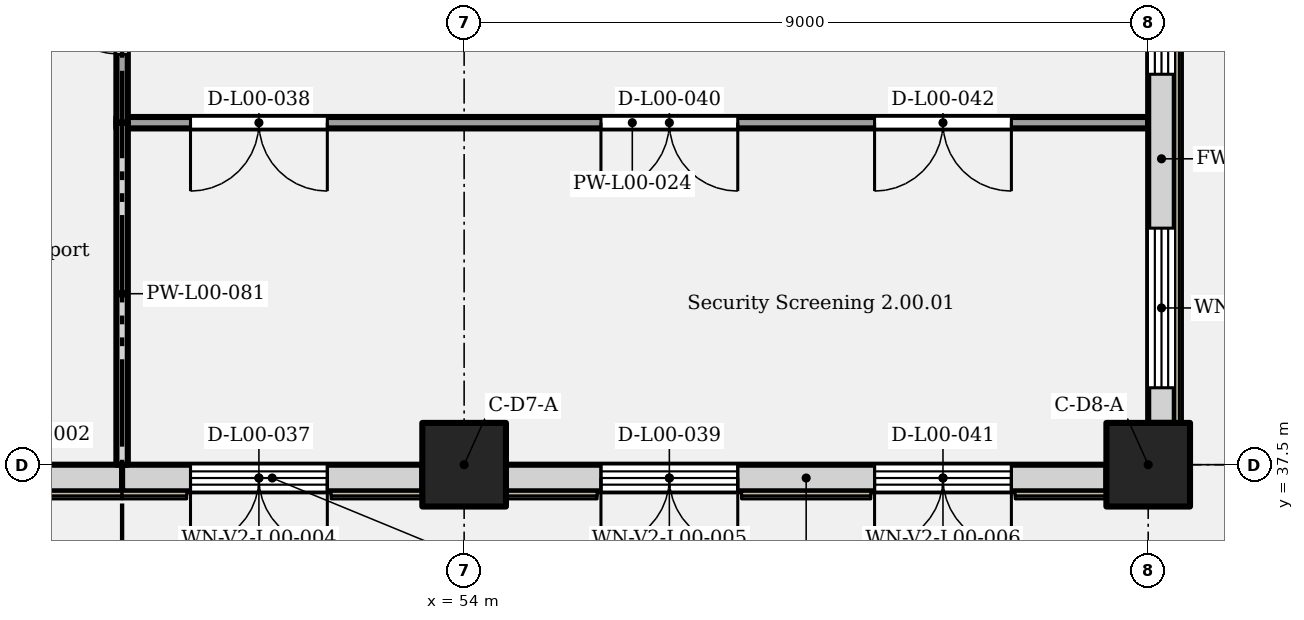
"""IFC4 building model, lengths in metres.
Left out: names, types, materials, properties, quantities, classifications, styles, units other than length and angle.
Written with IfcOpenShell. Run it as: python <this file> out.ifc"""

import sys

from ifc_helpers import new_model, si_unit, direction, frame, frame_2d, origin, origin_2d, place, context, subcontext, project, spatial, rectangle, extrude, element, fill, save


model = new_model("IFC4")
c1 = context("Model", 3, precision=1e-05, world=origin(), true_north=direction((0.0, 1.0)))
c2 = subcontext(c1, "Body", "Model", "MODEL_VIEW")
j1 = project(units=[si_unit("LENGTHUNIT", "METRE"), si_unit("PLANEANGLEUNIT", "RADIAN")], contexts=[c1])
p1 = place(None, origin())
s1 = spatial("IfcSite", under=j1, at=p1, CompositionType="ELEMENT")
p2 = place(p1, origin())
s2 = spatial("IfcBuilding", under=s1, at=p2, CompositionType="ELEMENT")
p3 = place(p2, origin())
s3 = spatial("IfcBuildingStorey", under=s2, at=p3, CompositionType="ELEMENT", Elevation=0.0)
for number, where, z_axis, x_axis in (
    (1, (54.0, 37.5, 0.0), (0.0, 0.0, 1.0), (1.0, 0.0, 0.0)),
    (2, (63.0, 37.5, 0.0), (0.0, 0.0, 1.0), (1.0, 0.0, 0.0)),
):
    element("IfcColumn", number, at=place(p3, frame(where, z_axis=z_axis, x_axis=x_axis)), inside=s3, PredefinedType="COLUMN", context=c2, shape_type="SweptSolid", body=[
        extrude(rectangle(XDim=1.1, YDim=1.1, at=origin_2d()), origin(), (0.0, 0.0, 1.0), 6.6),
    ])
p4 = place(p3, frame((45.55, 37.325, 0.0), z_axis=(0.0, 0.0, 1.0), x_axis=(1.0, 0.0, 0.0)))
e3 = element("IfcWall", 3, at=p4, inside=s3, PredefinedType="SOLIDWALL", context=c2, shape_type="SweptSolid", body=[
    extrude(rectangle(XDim=3.95, YDim=0.35, at=frame_2d((1.975, 0.0))), origin(), (0.0, 0.0, 1.0), 6.3),
])
p5 = place(p4, frame((0.425, 0.0, 1.05)))
e4 = element("IfcOpeningElement", 4, at=p5, cuts=e3, PredefinedType="OPENING", context=c2, shape_type="SweptSolid", body=[
    extrude(rectangle(XDim=1.05, YDim=2.4, at=frame_2d((0.525, 1.2))), frame((0.0, 0.185, 0.0), z_axis=(0.0, -1.0, 0.0), x_axis=(1.0, 0.0, 0.0)), (0.0, 0.0, 1.0), 0.37),
])
p6 = place(p3, frame((49.5, 37.325, 0.0), z_axis=(0.0, 0.0, 1.0), x_axis=(1.0, 0.0, 0.0)))
e5 = element("IfcWall", 5, at=p6, inside=s3, PredefinedType="SOLIDWALL", context=c2, shape_type="SweptSolid", body=[
    extrude(rectangle(XDim=3.95, YDim=0.35, at=frame_2d((1.975, 0.0))), origin(), (0.0, 0.0, 1.0), 6.3),
])
p7 = place(p6, frame((2.7, 0.0, 0.0), z_axis=(0.0, 0.0, 1.0), x_axis=(-1.0, 0.0, 0.0)))
e6 = element("IfcOpeningElement", 6, at=p7, cuts=e5, PredefinedType="OPENING", context=c2, shape_type="SweptSolid", body=[
    extrude(rectangle(XDim=1.8, YDim=2.1, at=frame_2d((0.9, 1.05))), frame((0.0, 0.185, 0.0), z_axis=(0.0, -1.0, 0.0), x_axis=(1.0, 0.0, 0.0)), (0.0, 0.0, 1.0), 0.37),
])
p8 = place(p6, frame((0.9, 0.0, 2.25)))
e7 = element("IfcOpeningElement", 7, at=p8, cuts=e5, PredefinedType="OPENING", context=c2, shape_type="SweptSolid", body=[
    extrude(rectangle(XDim=1.8, YDim=0.8, at=frame_2d((0.9, 0.4))), frame((0.0, 0.185, 0.0), z_axis=(0.0, -1.0, 0.0), x_axis=(1.0, 0.0, 0.0)), (0.0, 0.0, 1.0), 0.37),
])
p9 = place(p3, frame((54.55, 37.325, 0.0), z_axis=(0.0, 0.0, 1.0), x_axis=(1.0, 0.0, 0.0)))
e8 = element("IfcWall", 8, at=p9, inside=s3, PredefinedType="SOLIDWALL", context=c2, shape_type="SweptSolid", body=[
    extrude(rectangle(XDim=7.9, YDim=0.35, at=frame_2d((3.95, 0.0))), origin(), (0.0, 0.0, 1.0), 6.3),
])
p10 = place(p9, frame((3.05, 0.0, 0.0), z_axis=(0.0, 0.0, 1.0), x_axis=(-1.0, 0.0, 0.0)))
e9 = element("IfcOpeningElement", 9, at=p10, cuts=e8, PredefinedType="OPENING", context=c2, shape_type="SweptSolid", body=[
    extrude(rectangle(XDim=1.8, YDim=2.1, at=frame_2d((0.9, 1.05))), frame((0.0, 0.185, 0.0), z_axis=(0.0, -1.0, 0.0), x_axis=(1.0, 0.0, 0.0)), (0.0, 0.0, 1.0), 0.37),
])
p11 = place(p9, frame((1.25, 0.0, 2.25)))
e10 = element("IfcOpeningElement", 10, at=p11, cuts=e8, PredefinedType="OPENING", context=c2, shape_type="SweptSolid", body=[
    extrude(rectangle(XDim=1.8, YDim=0.8, at=frame_2d((0.9, 0.4))), frame((0.0, 0.185, 0.0), z_axis=(0.0, -1.0, 0.0), x_axis=(1.0, 0.0, 0.0)), (0.0, 0.0, 1.0), 0.37),
])
p12 = place(p9, frame((6.65, 0.0, 0.0), z_axis=(0.0, 0.0, 1.0), x_axis=(-1.0, 0.0, 0.0)))
e11 = element("IfcOpeningElement", 11, at=p12, cuts=e8, PredefinedType="OPENING", context=c2, shape_type="SweptSolid", body=[
    extrude(rectangle(XDim=1.8, YDim=2.1, at=frame_2d((0.9, 1.05))), frame((0.0, 0.185, 0.0), z_axis=(0.0, -1.0, 0.0), x_axis=(1.0, 0.0, 0.0)), (0.0, 0.0, 1.0), 0.37),
])
p13 = place(p9, frame((4.85, 0.0, 2.25)))
e12 = element("IfcOpeningElement", 12, at=p13, cuts=e8, PredefinedType="OPENING", context=c2, shape_type="SweptSolid", body=[
    extrude(rectangle(XDim=1.8, YDim=0.8, at=frame_2d((0.9, 0.4))), frame((0.0, 0.185, 0.0), z_axis=(0.0, -1.0, 0.0), x_axis=(1.0, 0.0, 0.0)), (0.0, 0.0, 1.0), 0.37),
])
p14 = place(p3, frame((63.175, 38.05, 0.0), z_axis=(0.0, 0.0, 1.0), x_axis=(0.0, 1.0, 0.0)))
e13 = element("IfcWall", 13, at=p14, inside=s3, PredefinedType="SOLIDWALL", context=c2, shape_type="SweptSolid", body=[
    extrude(rectangle(XDim=6.95, YDim=0.35, at=frame_2d((3.475, 0.0))), origin(), (0.0, 0.0, 1.0), 6.3),
])
p15 = place(p14, frame((0.462, 0.0, 0.9)))
e14 = element("IfcOpeningElement", 14, at=p15, cuts=e13, PredefinedType="OPENING", context=c2, shape_type="SweptSolid", body=[
    extrude(rectangle(XDim=2.1, YDim=3.6, at=frame_2d((1.05, 1.8))), frame((0.0, 0.185, 0.0), z_axis=(0.0, -1.0, 0.0), x_axis=(1.0, 0.0, 0.0)), (0.0, 0.0, 1.0), 0.37),
])
p16 = place(p14, frame((4.587, 0.0, 0.9)))
e15 = element("IfcOpeningElement", 15, at=p16, cuts=e13, PredefinedType="OPENING", context=c2, shape_type="SweptSolid", body=[
    extrude(rectangle(XDim=2.1, YDim=3.6, at=frame_2d((1.05, 1.8))), frame((0.0, 0.185, 0.0), z_axis=(0.0, -1.0, 0.0), x_axis=(1.0, 0.0, 0.0)), (0.0, 0.0, 1.0), 0.37),
])
p17 = place(p3, frame((49.425, 42.0, 0.0), z_axis=(0.0, 0.0, 1.0), x_axis=(1.0, 0.0, 0.0)))
e16 = element("IfcWall", 16, at=p17, inside=s3, PredefinedType="PARTITIONING", context=c2, shape_type="SweptSolid", body=[
    extrude(rectangle(XDim=13.575, YDim=0.15, at=frame_2d((6.788, 0.0))), origin(), (0.0, 0.0, 1.0), 6.3),
])
p18 = place(p17, frame((2.775, 0.0, 0.0), z_axis=(0.0, 0.0, 1.0), x_axis=(-1.0, 0.0, 0.0)))
e17 = element("IfcOpeningElement", 17, at=p18, cuts=e16, PredefinedType="OPENING", context=c2, shape_type="SweptSolid", body=[
    extrude(rectangle(XDim=1.8, YDim=2.1, at=frame_2d((0.9, 1.05))), frame((0.0, 0.085, 0.0), z_axis=(0.0, -1.0, 0.0), x_axis=(1.0, 0.0, 0.0)), (0.0, 0.0, 1.0), 0.17),
])
p19 = place(p17, frame((8.175, 0.0, 0.0), z_axis=(0.0, 0.0, 1.0), x_axis=(-1.0, 0.0, 0.0)))
e18 = element("IfcOpeningElement", 18, at=p19, cuts=e16, PredefinedType="OPENING", context=c2, shape_type="SweptSolid", body=[
    extrude(rectangle(XDim=1.8, YDim=2.1, at=frame_2d((0.9, 1.05))), frame((0.0, 0.085, 0.0), z_axis=(0.0, -1.0, 0.0), x_axis=(1.0, 0.0, 0.0)), (0.0, 0.0, 1.0), 0.17),
])
p20 = place(p17, frame((11.775, 0.0, 0.0), z_axis=(0.0, 0.0, 1.0), x_axis=(-1.0, 0.0, 0.0)))
e19 = element("IfcOpeningElement", 19, at=p20, cuts=e16, PredefinedType="OPENING", context=c2, shape_type="SweptSolid", body=[
    extrude(rectangle(XDim=1.8, YDim=2.1, at=frame_2d((0.9, 1.05))), frame((0.0, 0.085, 0.0), z_axis=(0.0, -1.0, 0.0), x_axis=(1.0, 0.0, 0.0)), (0.0, 0.0, 1.0), 0.17),
])
p21 = place(p3, frame((49.5, 37.5, 0.0), z_axis=(0.0, 0.0, 1.0), x_axis=(0.0, 1.0, 0.0)))
e20 = element("IfcWall", 20, at=p21, inside=s3, PredefinedType="PARTITIONING", context=c2, shape_type="SweptSolid", body=[
    extrude(rectangle(XDim=4.5, YDim=0.15, at=frame_2d((2.25, 0.0))), origin(), (0.0, 0.0, 1.0), 6.3),
])
p22 = place(p3, frame((49.5, 42.0, 0.0), z_axis=(0.0, 0.0, 1.0), x_axis=(0.0, 1.0, 0.0)))
e21 = element("IfcWall", 21, at=p22, inside=s3, PredefinedType="PARTITIONING", context=c2, shape_type="SweptSolid", body=[
    extrude(rectangle(XDim=12.0, YDim=0.15, at=frame_2d((6.0, 0.0))), origin(), (0.0, 0.0, 1.0), 6.3),
])
p23 = place(p22, frame((0.9, 0.0, 0.0)))
e22 = element("IfcOpeningElement", 22, at=p23, cuts=e21, PredefinedType="OPENING", context=c2, shape_type="SweptSolid", body=[
    extrude(rectangle(XDim=1.2, YDim=2.1, at=frame_2d((0.6, 1.05))), frame((0.0, 0.085, 0.0), z_axis=(0.0, -1.0, 0.0), x_axis=(1.0, 0.0, 0.0)), (0.0, 0.0, 1.0), 0.17),
])
p24 = place(p22, frame((6.9, 0.0, 0.0)))
e23 = element("IfcOpeningElement", 23, at=p24, cuts=e21, PredefinedType="OPENING", context=c2, shape_type="SweptSolid", body=[
    extrude(rectangle(XDim=1.2, YDim=2.1, at=frame_2d((0.6, 1.05))), frame((0.0, 0.085, 0.0), z_axis=(0.0, -1.0, 0.0), x_axis=(1.0, 0.0, 0.0)), (0.0, 0.0, 1.0), 0.17),
])
p25 = place(p7, origin())
e24 = element("IfcDoor", 24, at=p25, inside=s3, OperationType="DOUBLE_DOOR_SINGLE_SWING", PredefinedType="DOOR", context=c2, shape_type="SweptSolid", body=[
    extrude(rectangle(XDim=1.8, YDim=2.1, at=frame_2d((0.9, 1.05))), frame((0.0, 0.025, 0.0), z_axis=(0.0, -1.0, 0.0), x_axis=(1.0, 0.0, 0.0)), (0.0, 0.0, 1.0), 0.05),
])
fill(e6, e24)
p26 = place(p8, origin())
e25 = element("IfcWindow", 25, at=p26, inside=s3, PartitioningType="SINGLE_PANEL", PredefinedType="WINDOW", context=c2, shape_type="SweptSolid", body=[
    extrude(rectangle(XDim=1.8, YDim=0.8, at=frame_2d((0.9, 0.4))), frame((0.0, 0.03, 0.0), z_axis=(0.0, -1.0, 0.0), x_axis=(1.0, 0.0, 0.0)), (0.0, 0.0, 1.0), 0.06),
])
fill(e7, e25)
p27 = place(p10, origin())
e26 = element("IfcDoor", 26, at=p27, inside=s3, OperationType="DOUBLE_DOOR_SINGLE_SWING", PredefinedType="DOOR", context=c2, shape_type="SweptSolid", body=[
    extrude(rectangle(XDim=1.8, YDim=2.1, at=frame_2d((0.9, 1.05))), frame((0.0, 0.025, 0.0), z_axis=(0.0, -1.0, 0.0), x_axis=(1.0, 0.0, 0.0)), (0.0, 0.0, 1.0), 0.05),
])
fill(e9, e26)
p28 = place(p11, origin())
e27 = element("IfcWindow", 27, at=p28, inside=s3, PartitioningType="SINGLE_PANEL", PredefinedType="WINDOW", context=c2, shape_type="SweptSolid", body=[
    extrude(rectangle(XDim=1.8, YDim=0.8, at=frame_2d((0.9, 0.4))), frame((0.0, 0.03, 0.0), z_axis=(0.0, -1.0, 0.0), x_axis=(1.0, 0.0, 0.0)), (0.0, 0.0, 1.0), 0.06),
])
fill(e10, e27)
p29 = place(p12, origin())
e28 = element("IfcDoor", 28, at=p29, inside=s3, OperationType="DOUBLE_DOOR_SINGLE_SWING", PredefinedType="DOOR", context=c2, shape_type="SweptSolid", body=[
    extrude(rectangle(XDim=1.8, YDim=2.1, at=frame_2d((0.9, 1.05))), frame((0.0, 0.025, 0.0), z_axis=(0.0, -1.0, 0.0), x_axis=(1.0, 0.0, 0.0)), (0.0, 0.0, 1.0), 0.05),
])
fill(e11, e28)
p30 = place(p13, origin())
e29 = element("IfcWindow", 29, at=p30, inside=s3, PartitioningType="SINGLE_PANEL", PredefinedType="WINDOW", context=c2, shape_type="SweptSolid", body=[
    extrude(rectangle(XDim=1.8, YDim=0.8, at=frame_2d((0.9, 0.4))), frame((0.0, 0.03, 0.0), z_axis=(0.0, -1.0, 0.0), x_axis=(1.0, 0.0, 0.0)), (0.0, 0.0, 1.0), 0.06),
])
fill(e12, e29)
p31 = place(p15, origin())
e30 = element("IfcWindow", 30, at=p31, inside=s3, PartitioningType="SINGLE_PANEL", PredefinedType="WINDOW", context=c2, shape_type="SweptSolid", body=[
    extrude(rectangle(XDim=2.1, YDim=3.6, at=frame_2d((1.05, 1.8))), frame((0.0, 0.03, 0.0), z_axis=(0.0, -1.0, 0.0), x_axis=(1.0, 0.0, 0.0)), (0.0, 0.0, 1.0), 0.06),
])
fill(e14, e30)
p32 = place(p16, origin())
e31 = element("IfcWindow", 31, at=p32, inside=s3, PartitioningType="SINGLE_PANEL", PredefinedType="WINDOW", context=c2, shape_type="SweptSolid", body=[
    extrude(rectangle(XDim=2.1, YDim=3.6, at=frame_2d((1.05, 1.8))), frame((0.0, 0.03, 0.0), z_axis=(0.0, -1.0, 0.0), x_axis=(1.0, 0.0, 0.0)), (0.0, 0.0, 1.0), 0.06),
])
fill(e15, e31)
p33 = place(p18, origin())
e32 = element("IfcDoor", 32, at=p33, inside=s3, OperationType="DOUBLE_DOOR_SINGLE_SWING", PredefinedType="DOOR", context=c2, shape_type="SweptSolid", body=[
    extrude(rectangle(XDim=1.8, YDim=2.1, at=frame_2d((0.9, 1.05))), frame((0.0, 0.025, 0.0), z_axis=(0.0, -1.0, 0.0), x_axis=(1.0, 0.0, 0.0)), (0.0, 0.0, 1.0), 0.05),
])
fill(e17, e32)
p34 = place(p19, origin())
e33 = element("IfcDoor", 33, at=p34, inside=s3, OperationType="DOUBLE_DOOR_SINGLE_SWING", PredefinedType="DOOR", context=c2, shape_type="SweptSolid", body=[
    extrude(rectangle(XDim=1.8, YDim=2.1, at=frame_2d((0.9, 1.05))), frame((0.0, 0.025, 0.0), z_axis=(0.0, -1.0, 0.0), x_axis=(1.0, 0.0, 0.0)), (0.0, 0.0, 1.0), 0.05),
])
fill(e18, e33)
p35 = place(p20, origin())
e34 = element("IfcDoor", 34, at=p35, inside=s3, OperationType="DOUBLE_DOOR_SINGLE_SWING", PredefinedType="DOOR", context=c2, shape_type="SweptSolid", body=[
    extrude(rectangle(XDim=1.8, YDim=2.1, at=frame_2d((0.9, 1.05))), frame((0.0, 0.025, 0.0), z_axis=(0.0, -1.0, 0.0), x_axis=(1.0, 0.0, 0.0)), (0.0, 0.0, 1.0), 0.05),
])
fill(e19, e34)
p36 = place(p23, origin())
e35 = element("IfcDoor", 35, at=p36, inside=s3, OperationType="SINGLE_SWING_RIGHT", PredefinedType="DOOR", context=c2, shape_type="SweptSolid", body=[
    extrude(rectangle(XDim=1.2, YDim=2.1, at=frame_2d((0.6, 1.05))), frame((0.0, 0.025, 0.0), z_axis=(0.0, -1.0, 0.0), x_axis=(1.0, 0.0, 0.0)), (0.0, 0.0, 1.0), 0.05),
])
fill(e22, e35)
save(model, sys.argv[1])
